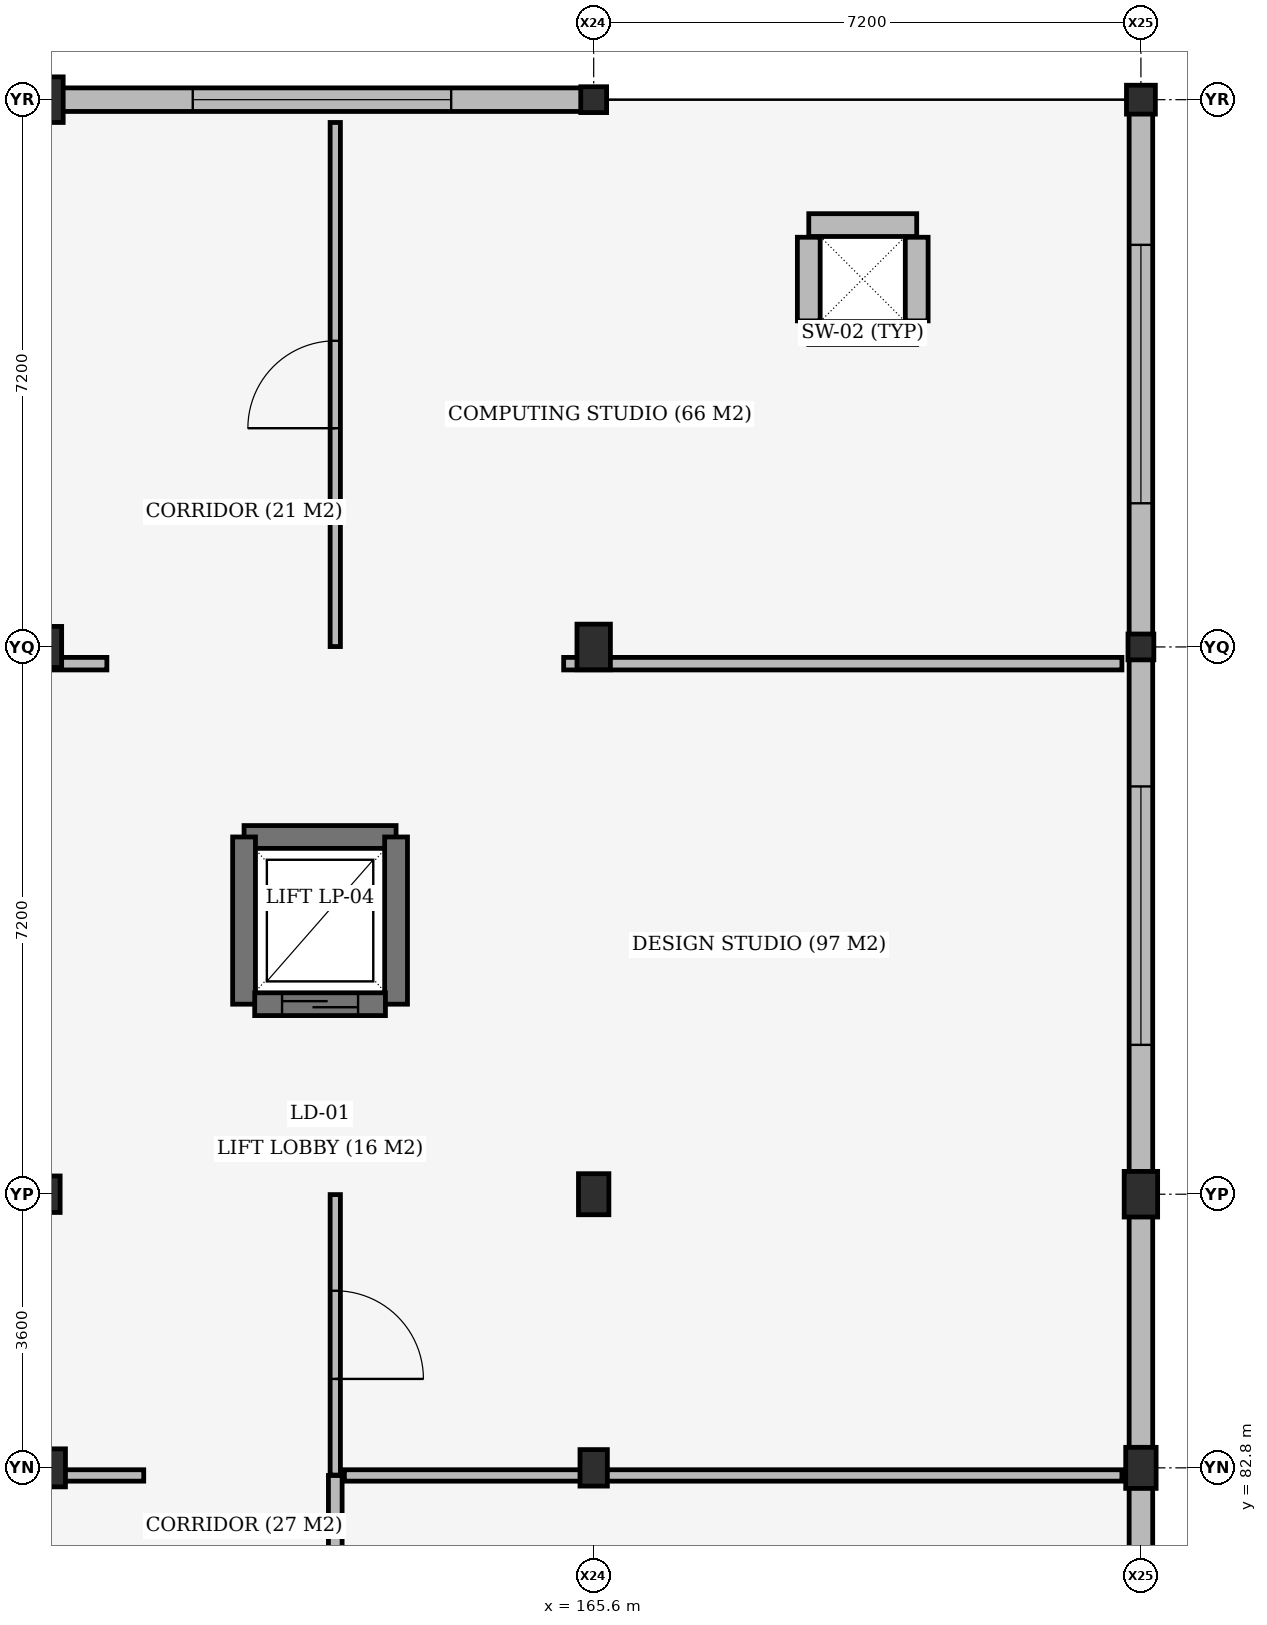
"""IFC4 building model, lengths in metres.
Left out: names, types, materials, properties, quantities, classifications, styles, units other than length and angle.
Written with IfcOpenShell. Run it as: python <this file> out.ifc"""

import sys

from ifc_helpers import new_model, si_unit, direction, frame, frame_2d, origin, origin_2d, place, context, subcontext, project, spatial, rectangle, extrude, element, fill, save


model = new_model("IFC4")
c1 = context("Model", 3, precision=1e-05, world=origin(), true_north=direction((0.0, 1.0)))
c2 = subcontext(c1, "Body", "Model", "MODEL_VIEW")
j1 = project(units=[si_unit("LENGTHUNIT", "METRE"), si_unit("PLANEANGLEUNIT", "RADIAN")], contexts=[c1])
p1 = place(None, origin())
s1 = spatial("IfcSite", under=j1, at=p1, CompositionType="ELEMENT")
p2 = place(p1, origin())
s2 = spatial("IfcBuilding", under=s1, at=p2, CompositionType="ELEMENT")
p3 = place(p2, frame((0.0, 0.0, 13.8)))
s3 = spatial("IfcBuildingStorey", under=s2, at=p3, CompositionType="ELEMENT", Elevation=13.8)
p4 = place(p3, frame((168.43, 97.73, 0.0), z_axis=(0.0, 0.0, 1.0), x_axis=(1.0, 0.0, 0.0)))
e1 = element("IfcWall", 1, at=p4, inside=s3, PredefinedType="SHEAR", context=c2, shape_type="SweptSolid", body=[
    extrude(rectangle(XDim=1.42, YDim=0.3, at=frame_2d((0.71, 0.0))), origin(), (0.0, 0.0, 1.0), 3.96),
])
p5 = place(p3, frame((169.85, 97.89, 0.0), z_axis=(0.0, 0.0, 1.0), x_axis=(0.0, 1.0, 0.0)))
e2 = element("IfcWall", 2, at=p5, inside=s3, PredefinedType="SHEAR", context=c2, shape_type="SweptSolid", body=[
    extrude(rectangle(XDim=1.1, YDim=0.3, at=frame_2d((0.55, 0.0))), origin(), (0.0, 0.0, 1.0), 3.96),
])
p6 = place(p3, frame((169.85, 99.15, 0.0), z_axis=(0.0, 0.0, 1.0), x_axis=(-1.0, 0.0, 0.0)))
e3 = element("IfcWall", 3, at=p6, inside=s3, PredefinedType="SHEAR", context=c2, shape_type="SweptSolid", body=[
    extrude(rectangle(XDim=1.42, YDim=0.3, at=frame_2d((0.71, 0.0))), origin(), (0.0, 0.0, 1.0), 3.96),
])
p7 = place(p3, frame((168.43, 98.99, 0.0), z_axis=(0.0, 0.0, 1.0), x_axis=(0.0, -1.0, 0.0)))
e4 = element("IfcWall", 4, at=p7, inside=s3, PredefinedType="SHEAR", context=c2, shape_type="SweptSolid", body=[
    extrude(rectangle(XDim=1.1, YDim=0.3, at=frame_2d((0.55, 0.0))), origin(), (0.0, 0.0, 1.0), 3.96),
])
p8 = place(p3, frame((158.4, 82.8, 0.0), z_axis=(0.0, 0.0, 1.0), x_axis=(1.0, 0.0, 0.0)))
e5 = element("IfcColumn", 5, at=p8, inside=s3, PredefinedType="COLUMN", context=c2, shape_type="SweptSolid", body=[
    extrude(rectangle(XDim=0.5, YDim=0.5, at=origin_2d()), origin(), (0.0, 0.0, 1.0), 3.935),
])
p9 = place(p3, frame((158.4, 86.4, 0.0), z_axis=(0.0, 0.0, 1.0), x_axis=(1.0, 0.0, 0.0)))
e6 = element("IfcColumn", 6, at=p9, inside=s3, PredefinedType="COLUMN", context=c2, shape_type="SweptSolid", body=[
    extrude(rectangle(XDim=0.36, YDim=0.48, at=origin_2d()), origin(), (0.0, 0.0, 1.0), 3.935),
])
p10 = place(p3, frame((158.4, 93.6, 0.0), z_axis=(0.0, 0.0, 1.0), x_axis=(1.0, 0.0, 0.0)))
e7 = element("IfcColumn", 7, at=p10, inside=s3, PredefinedType="COLUMN", context=c2, shape_type="SweptSolid", body=[
    extrude(rectangle(XDim=0.4, YDim=0.54, at=origin_2d()), origin(), (0.0, 0.0, 1.0), 3.935),
])
p11 = place(p3, frame((158.4, 100.8, 0.0), z_axis=(0.0, 0.0, 1.0), x_axis=(1.0, 0.0, 0.0)))
e8 = element("IfcColumn", 8, at=p11, inside=s3, PredefinedType="COLUMN", context=c2, shape_type="SweptSolid", body=[
    extrude(rectangle(XDim=0.44, YDim=0.6, at=origin_2d()), origin(), (0.0, 0.0, 1.0), 3.935),
])
p12 = place(p3, frame((165.6, 82.8, 0.0), z_axis=(0.0, 0.0, 1.0), x_axis=(1.0, 0.0, 0.0)))
e9 = element("IfcColumn", 9, at=p12, inside=s3, PredefinedType="COLUMN", context=c2, shape_type="SweptSolid", body=[
    extrude(rectangle(XDim=0.36, YDim=0.48, at=origin_2d()), origin(), (0.0, 0.0, 1.0), 3.935),
])
p13 = place(p3, frame((165.6, 86.4, 0.0), z_axis=(0.0, 0.0, 1.0), x_axis=(1.0, 0.0, 0.0)))
e10 = element("IfcColumn", 10, at=p13, inside=s3, PredefinedType="COLUMN", context=c2, shape_type="SweptSolid", body=[
    extrude(rectangle(XDim=0.4, YDim=0.54, at=origin_2d()), origin(), (0.0, 0.0, 1.0), 3.935),
])
p14 = place(p3, frame((165.6, 93.6, 0.0), z_axis=(0.0, 0.0, 1.0), x_axis=(1.0, 0.0, 0.0)))
e11 = element("IfcColumn", 11, at=p14, inside=s3, PredefinedType="COLUMN", context=c2, shape_type="SweptSolid", body=[
    extrude(rectangle(XDim=0.44, YDim=0.6, at=origin_2d()), origin(), (0.0, 0.0, 1.0), 3.935),
])
p15 = place(p3, frame((165.6, 100.8, 0.0), z_axis=(0.0, 0.0, 1.0), x_axis=(1.0, 0.0, 0.0)))
e12 = element("IfcColumn", 12, at=p15, inside=s3, PredefinedType="COLUMN", context=c2, shape_type="SweptSolid", body=[
    extrude(rectangle(XDim=0.34, YDim=0.34, at=origin_2d()), origin(), (0.0, 0.0, 1.0), 3.935),
])
p16 = place(p3, frame((172.8, 82.8, 0.0), z_axis=(0.0, 0.0, 1.0), x_axis=(1.0, 0.0, 0.0)))
e13 = element("IfcColumn", 13, at=p16, inside=s3, PredefinedType="COLUMN", context=c2, shape_type="SweptSolid", body=[
    extrude(rectangle(XDim=0.4, YDim=0.54, at=origin_2d()), origin(), (0.0, 0.0, 1.0), 3.935),
])
p17 = place(p3, frame((172.8, 86.4, 0.0), z_axis=(0.0, 0.0, 1.0), x_axis=(1.0, 0.0, 0.0)))
e14 = element("IfcColumn", 14, at=p17, inside=s3, PredefinedType="COLUMN", context=c2, shape_type="SweptSolid", body=[
    extrude(rectangle(XDim=0.44, YDim=0.6, at=origin_2d()), origin(), (0.0, 0.0, 1.0), 3.935),
])
p18 = place(p3, frame((172.8, 93.6, 0.0), z_axis=(0.0, 0.0, 1.0), x_axis=(1.0, 0.0, 0.0)))
e15 = element("IfcColumn", 15, at=p18, inside=s3, PredefinedType="COLUMN", context=c2, shape_type="SweptSolid", body=[
    extrude(rectangle(XDim=0.34, YDim=0.34, at=origin_2d()), origin(), (0.0, 0.0, 1.0), 3.935),
])
p19 = place(p3, frame((172.8, 100.8, 0.0), z_axis=(0.0, 0.0, 1.0), x_axis=(1.0, 0.0, 0.0)))
e16 = element("IfcColumn", 16, at=p19, inside=s3, PredefinedType="COLUMN", context=c2, shape_type="SweptSolid", body=[
    extrude(rectangle(XDim=0.38, YDim=0.38, at=origin_2d()), origin(), (0.0, 0.0, 1.0), 3.935),
])
p20 = place(p3, frame((163.0, 91.1, 0.0), z_axis=(0.0, 0.0, 1.0), x_axis=(-1.0, 0.0, 0.0)))
e17 = element("IfcWall", 17, at=p20, inside=s3, PredefinedType="SHEAR", context=c2, shape_type="SweptSolid", body=[
    extrude(rectangle(XDim=2.0, YDim=0.3, at=frame_2d((1.0, 0.0))), origin(), (0.0, 0.0, 1.0), 3.935),
])
for number, where, z_axis, x_axis in (
    (18, (161.0, 91.1, 0.0), (0.0, 0.0, 1.0), (0.0, -1.0, 0.0)),
    (19, (163.0, 88.9, 0.0), (0.0, 0.0, 1.0), (0.0, 1.0, 0.0)),
):
    element("IfcWall", number, at=place(p3, frame(where, z_axis=z_axis, x_axis=x_axis)), inside=s3, PredefinedType="SHEAR", context=c2, shape_type="SweptSolid", body=[
        extrude(rectangle(XDim=2.2, YDim=0.3, at=frame_2d((1.1, 0.0))), origin(), (0.0, 0.0, 1.0), 3.935),
    ])
p21 = place(p3, frame((158.612, 100.8, 0.0), z_axis=(0.0, 0.0, 1.0), x_axis=(1.0, 0.0, 0.0)))
e20 = element("IfcWall", 20, at=p21, inside=s3, PredefinedType="STANDARD", context=c2, shape_type="SweptSolid", body=[
    extrude(rectangle(XDim=6.826, YDim=0.31, at=frame_2d((3.413, 0.0))), origin(), (0.0, 0.0, 1.0), 3.255),
])
p22 = place(p21, frame((1.713, 0.0, 0.9)))
e21 = element("IfcOpeningElement", 21, at=p22, cuts=e20, PredefinedType="OPENING", context=c2, shape_type="SweptSolid", body=[
    extrude(rectangle(XDim=3.4, YDim=1.5, at=frame_2d((1.7, 0.75))), frame((0.0, 0.165, 0.0), z_axis=(0.0, -1.0, 0.0), x_axis=(1.0, 0.0, 0.0)), (0.0, 0.0, 1.0), 0.33),
])
p23 = place(p3, frame((172.8, 82.538, 0.0), z_axis=(0.0, 0.0, 1.0), x_axis=(0.0, -1.0, 0.0)))
e22 = element("IfcWall", 22, at=p23, inside=s3, PredefinedType="STANDARD", context=c2, shape_type="SweptSolid", body=[
    extrude(rectangle(XDim=6.706, YDim=0.31, at=frame_2d((3.353, 0.0))), origin(), (0.0, 0.0, 1.0), 3.255),
])
p24 = place(p23, frame((1.653, 0.0, 0.9)))
e23 = element("IfcOpeningElement", 23, at=p24, cuts=e22, PredefinedType="OPENING", context=c2, shape_type="SweptSolid", body=[
    extrude(rectangle(XDim=3.4, YDim=1.5, at=frame_2d((1.7, 0.75))), frame((0.0, 0.165, 0.0), z_axis=(0.0, -1.0, 0.0), x_axis=(1.0, 0.0, 0.0)), (0.0, 0.0, 1.0), 0.33),
])
p25 = place(p3, frame((172.8, 86.108, 0.0), z_axis=(0.0, 0.0, 1.0), x_axis=(0.0, -1.0, 0.0)))
e24 = element("IfcWall", 24, at=p25, inside=s3, PredefinedType="STANDARD", context=c2, shape_type="SweptSolid", body=[
    extrude(rectangle(XDim=3.046, YDim=0.31, at=frame_2d((1.523, 0.0))), origin(), (0.0, 0.0, 1.0), 3.195),
])
p26 = place(p3, frame((172.8, 93.438, 0.0), z_axis=(0.0, 0.0, 1.0), x_axis=(0.0, -1.0, 0.0)))
e25 = element("IfcWall", 25, at=p26, inside=s3, PredefinedType="STANDARD", context=c2, shape_type="SweptSolid", body=[
    extrude(rectangle(XDim=6.746, YDim=0.31, at=frame_2d((3.373, 0.0))), origin(), (0.0, 0.0, 1.0), 3.415),
])
p27 = place(p26, frame((1.673, 0.0, 0.9)))
e26 = element("IfcOpeningElement", 26, at=p27, cuts=e25, PredefinedType="OPENING", context=c2, shape_type="SweptSolid", body=[
    extrude(rectangle(XDim=3.4, YDim=1.5, at=frame_2d((1.7, 0.75))), frame((0.0, 0.165, 0.0), z_axis=(0.0, -1.0, 0.0), x_axis=(1.0, 0.0, 0.0)), (0.0, 0.0, 1.0), 0.33),
])
p28 = place(p3, frame((172.8, 100.618, 0.0), z_axis=(0.0, 0.0, 1.0), x_axis=(0.0, -1.0, 0.0)))
e27 = element("IfcWall", 27, at=p28, inside=s3, PredefinedType="STANDARD", context=c2, shape_type="SweptSolid", body=[
    extrude(rectangle(XDim=6.856, YDim=0.31, at=frame_2d((3.428, 0.0))), origin(), (0.0, 0.0, 1.0), 3.355),
])
p29 = place(p28, frame((1.728, 0.0, 0.9)))
e28 = element("IfcOpeningElement", 28, at=p29, cuts=e27, PredefinedType="OPENING", context=c2, shape_type="SweptSolid", body=[
    extrude(rectangle(XDim=3.4, YDim=1.5, at=frame_2d((1.7, 0.75))), frame((0.0, 0.165, 0.0), z_axis=(0.0, -1.0, 0.0), x_axis=(1.0, 0.0, 0.0)), (0.0, 0.0, 1.0), 0.33),
])
p30 = place(p3, frame((162.86, 88.9, 0.0), z_axis=(0.0, 0.0, 1.0), x_axis=(-1.0, 0.0, 0.0)))
e29 = element("IfcWall", 29, at=p30, inside=s3, PredefinedType="SHEAR", context=c2, shape_type="SweptSolid", body=[
    extrude(rectangle(XDim=1.72, YDim=0.3, at=frame_2d((0.86, 0.0))), origin(), (0.0, 0.0, 1.0), 3.935),
])
p31 = place(p30, frame((0.36, 0.0, 0.0)))
e30 = element("IfcOpeningElement", 30, at=p31, cuts=e29, PredefinedType="OPENING", context=c2, shape_type="SweptSolid", body=[
    extrude(rectangle(XDim=1.0, YDim=2.1, at=frame_2d((0.5, 1.05))), frame((0.0, 0.16, 0.0), z_axis=(0.0, -1.0, 0.0), x_axis=(1.0, 0.0, 0.0)), (0.0, 0.0, 1.0), 0.32),
])
p32 = place(p3, frame((136.885, 82.7, 0.0), z_axis=(0.0, 0.0, 1.0), x_axis=(1.0, 0.0, 0.0)))
e31 = element("IfcWall", 31, at=p32, inside=s3, PredefinedType="PARTITIONING", context=c2, shape_type="SweptSolid", body=[
    extrude(rectangle(XDim=22.795, YDim=0.15, at=frame_2d((11.397, 0.0))), origin(), (0.0, 0.0, 1.0), 3.195),
])
p33 = place(p3, frame((137.205, 93.38, 0.0), z_axis=(0.0, 0.0, 1.0), x_axis=(1.0, 0.0, 0.0)))
e32 = element("IfcWall", 32, at=p33, inside=s3, PredefinedType="PARTITIONING", context=c2, shape_type="SweptSolid", body=[
    extrude(rectangle(XDim=21.99, YDim=0.165, at=frame_2d((10.995, 0.0))), origin(), (0.0, 0.0, 1.0), 3.195),
])
p34 = place(p3, frame((162.2, 74.055, 0.0), z_axis=(0.0, 0.0, 1.0), x_axis=(0.0, 1.0, 0.0)))
e33 = element("IfcWall", 33, at=p34, inside=s3, PredefinedType="PARTITIONING", context=c2, shape_type="SweptSolid", body=[
    extrude(rectangle(XDim=8.645, YDim=0.18, at=frame_2d((4.323, 0.0))), origin(), (0.0, 0.0, 1.0), 3.255),
])
p35 = place(p34, frame((3.833, 0.0, 0.0)))
e34 = element("IfcOpeningElement", 34, at=p35, cuts=e33, PredefinedType="OPENING", context=c2, shape_type="SweptSolid", body=[
    extrude(rectangle(XDim=0.98, YDim=2.18, at=frame_2d((0.49, 1.09))), frame((0.0, 0.1, 0.0), z_axis=(0.0, -1.0, 0.0), x_axis=(1.0, 0.0, 0.0)), (0.0, 0.0, 1.0), 0.2),
])
p36 = place(p3, frame((162.32, 82.7, 0.0), z_axis=(0.0, 0.0, 1.0), x_axis=(1.0, 0.0, 0.0)))
e35 = element("IfcWall", 35, at=p36, inside=s3, PredefinedType="PARTITIONING", context=c2, shape_type="SweptSolid", body=[
    extrude(rectangle(XDim=10.23, YDim=0.15, at=frame_2d((5.115, 0.0))), origin(), (0.0, 0.0, 1.0), 3.255),
])
p37 = place(p3, frame((162.2, 82.705, 0.0), z_axis=(0.0, 0.0, 1.0), x_axis=(0.0, 1.0, 0.0)))
e36 = element("IfcWall", 36, at=p37, inside=s3, PredefinedType="PARTITIONING", context=c2, shape_type="SweptSolid", body=[
    extrude(rectangle(XDim=3.69, YDim=0.135, at=frame_2d((1.845, 0.0))), origin(), (0.0, 0.0, 1.0), 3.195),
])
p38 = place(p37, frame((1.265, 0.0, 0.0)))
e37 = element("IfcOpeningElement", 37, at=p38, cuts=e36, PredefinedType="OPENING", context=c2, shape_type="SweptSolid", body=[
    extrude(rectangle(XDim=1.16, YDim=2.2, at=frame_2d((0.58, 1.1))), frame((0.0, 0.077, 0.0), z_axis=(0.0, -1.0, 0.0), x_axis=(1.0, 0.0, 0.0)), (0.0, 0.0, 1.0), 0.155),
])
p39 = place(p3, frame((165.205, 93.38, 0.0), z_axis=(0.0, 0.0, 1.0), x_axis=(1.0, 0.0, 0.0)))
e38 = element("IfcWall", 38, at=p39, inside=s3, PredefinedType="PARTITIONING", context=c2, shape_type="SweptSolid", body=[
    extrude(rectangle(XDim=7.345, YDim=0.165, at=frame_2d((3.672, 0.0))), origin(), (0.0, 0.0, 1.0), 3.295),
])
p40 = place(p3, frame((162.2, 93.605, 0.0), z_axis=(0.0, 0.0, 1.0), x_axis=(0.0, 1.0, 0.0)))
e39 = element("IfcWall", 39, at=p40, inside=s3, PredefinedType="PARTITIONING", context=c2, shape_type="SweptSolid", body=[
    extrude(rectangle(XDim=6.895, YDim=0.135, at=frame_2d((3.448, 0.0))), origin(), (0.0, 0.0, 1.0), 3.355),
])
p41 = place(p40, frame((2.873, 0.0, 0.0)))
e40 = element("IfcOpeningElement", 40, at=p41, cuts=e39, PredefinedType="OPENING", context=c2, shape_type="SweptSolid", body=[
    extrude(rectangle(XDim=1.15, YDim=2.2, at=frame_2d((0.575, 1.1))), frame((0.0, 0.077, 0.0), z_axis=(0.0, -1.0, 0.0), x_axis=(1.0, 0.0, 0.0)), (0.0, 0.0, 1.0), 0.155),
])
p42 = place(p22, origin())
e41 = element("IfcWindow", 41, at=p42, inside=s3, PartitioningType="DOUBLE_PANEL_VERTICAL", PredefinedType="WINDOW", context=c2, shape_type="SweptSolid", body=[
    extrude(rectangle(XDim=3.4, YDim=1.5, at=frame_2d((1.7, 0.75))), frame((0.0, 0.03, 0.0), z_axis=(0.0, -1.0, 0.0), x_axis=(1.0, 0.0, 0.0)), (0.0, 0.0, 1.0), 0.06),
])
fill(e21, e41)
p43 = place(p27, origin())
e42 = element("IfcWindow", 42, at=p43, inside=s3, PartitioningType="DOUBLE_PANEL_VERTICAL", PredefinedType="WINDOW", context=c2, shape_type="SweptSolid", body=[
    extrude(rectangle(XDim=3.4, YDim=1.5, at=frame_2d((1.7, 0.75))), frame((0.0, 0.03, 0.0), z_axis=(0.0, -1.0, 0.0), x_axis=(1.0, 0.0, 0.0)), (0.0, 0.0, 1.0), 0.06),
])
fill(e26, e42)
p44 = place(p29, origin())
e43 = element("IfcWindow", 43, at=p44, inside=s3, PartitioningType="DOUBLE_PANEL_VERTICAL", PredefinedType="WINDOW", context=c2, shape_type="SweptSolid", body=[
    extrude(rectangle(XDim=3.4, YDim=1.5, at=frame_2d((1.7, 0.75))), frame((0.0, 0.03, 0.0), z_axis=(0.0, -1.0, 0.0), x_axis=(1.0, 0.0, 0.0)), (0.0, 0.0, 1.0), 0.06),
])
fill(e28, e43)
p45 = place(p31, origin())
e44 = element("IfcDoor", 44, at=p45, inside=s3, OperationType="SLIDING_TO_LEFT", PredefinedType="DOOR", context=c2, shape_type="SweptSolid", body=[
    extrude(rectangle(XDim=1.0, YDim=2.1, at=frame_2d((0.5, 1.05))), frame((0.0, 0.025, 0.0), z_axis=(0.0, -1.0, 0.0), x_axis=(1.0, 0.0, 0.0)), (0.0, 0.0, 1.0), 0.05),
])
fill(e30, e44)
p46 = place(p38, origin())
e45 = element("IfcDoor", 45, at=p46, inside=s3, OperationType="SINGLE_SWING_RIGHT", PredefinedType="DOOR", context=c2, shape_type="SweptSolid", body=[
    extrude(rectangle(XDim=1.16, YDim=2.2, at=frame_2d((0.58, 1.1))), frame((0.0, 0.025, 0.0), z_axis=(0.0, -1.0, 0.0), x_axis=(1.0, 0.0, 0.0)), (0.0, 0.0, 1.0), 0.05),
])
fill(e37, e45)
p47 = place(p41, origin())
e46 = element("IfcDoor", 46, at=p47, inside=s3, OperationType="SINGLE_SWING_LEFT", PredefinedType="DOOR", context=c2, shape_type="SweptSolid", body=[
    extrude(rectangle(XDim=1.15, YDim=2.2, at=frame_2d((0.575, 1.1))), frame((0.0, 0.025, 0.0), z_axis=(0.0, -1.0, 0.0), x_axis=(1.0, 0.0, 0.0)), (0.0, 0.0, 1.0), 0.05),
])
fill(e40, e46)
save(model, sys.argv[1])
